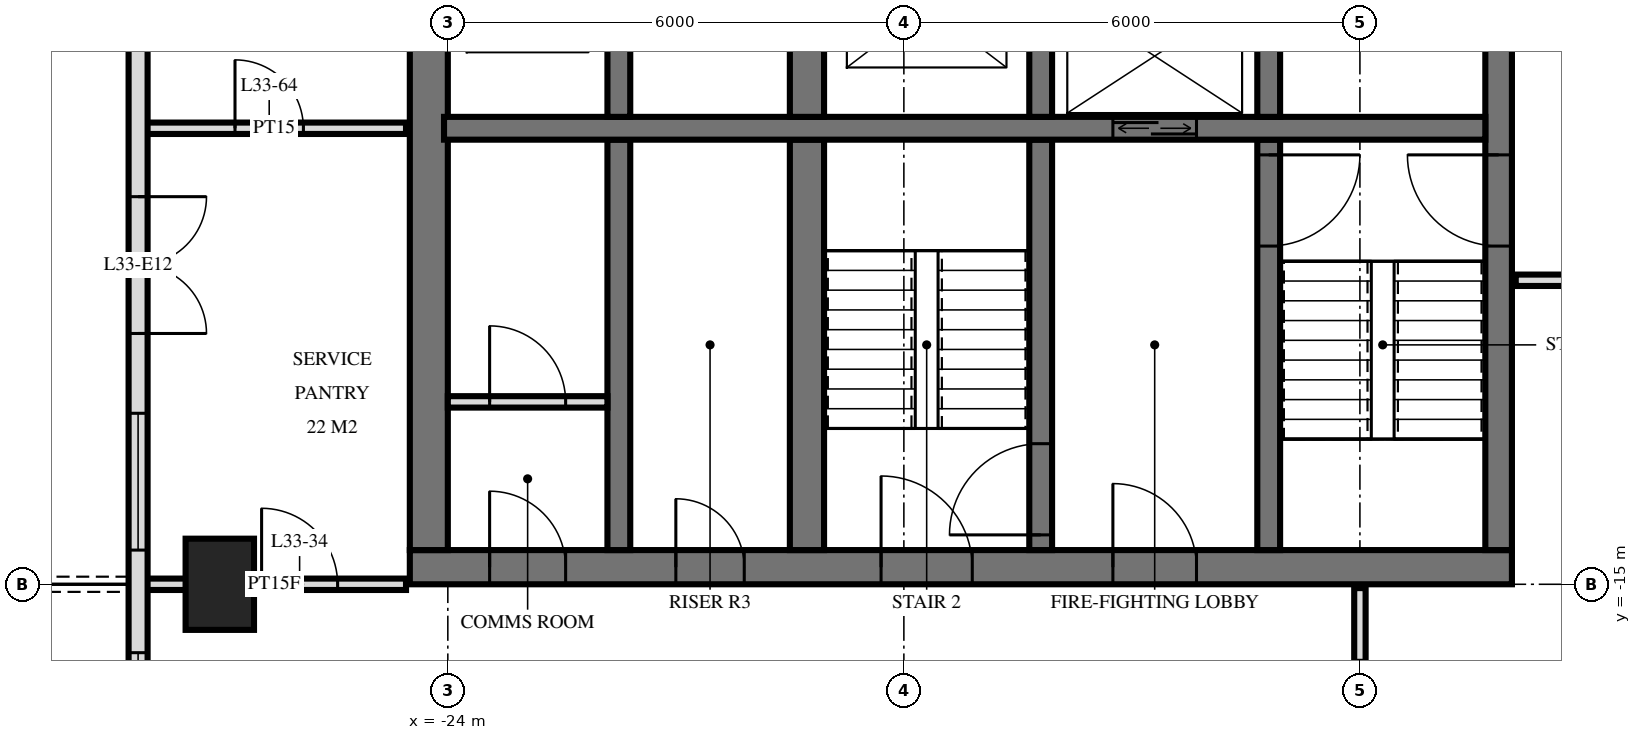
"""IFC4 building model, lengths in metres.
Left out: names, types, materials, properties, quantities, classifications, styles, units other than length and angle.
Written with IfcOpenShell. Run it as: python <this file> out.ifc"""

import sys

from ifc_helpers import new_model, si_unit, direction, frame, frame_2d, origin, origin_2d, place, context, subcontext, project, spatial, rectangle, extrude, element, fill, save


model = new_model("IFC4")
c1 = context("Model", 3, precision=1e-05, world=origin(), true_north=direction((0.0, 1.0)))
c2 = subcontext(c1, "Body", "Model", "MODEL_VIEW")
j1 = project(units=[si_unit("LENGTHUNIT", "METRE"), si_unit("PLANEANGLEUNIT", "RADIAN")], contexts=[c1])
p1 = place(None, origin())
s1 = spatial("IfcSite", under=j1, at=p1, CompositionType="ELEMENT")
p2 = place(p1, origin())
s2 = spatial("IfcBuilding", under=s1, at=p2, CompositionType="ELEMENT")
p3 = place(p2, frame((0.0, 0.0, 130.8)))
s3 = spatial("IfcBuildingStorey", under=s2, at=p3, CompositionType="ELEMENT", Elevation=130.8)
p4 = place(p3, frame((-27.0, -15.0, 0.0), z_axis=(0.0, 0.0, 1.0), x_axis=(0.0, 1.0, 0.0)))
e1 = element("IfcColumn", 1, at=p4, inside=s3, PredefinedType="COLUMN", context=c2, shape_type="SweptSolid", body=[
    extrude(rectangle(XDim=1.2, YDim=0.9, at=origin_2d()), origin(), (0.0, 0.0, 1.0), 3.6),
])
p5 = place(p3, frame((-24.5, -14.775, 0.0), z_axis=(0.0, 0.0, 1.0), x_axis=(1.0, 0.0, 0.0)))
e2 = element("IfcWall", 2, at=p5, inside=s3, PredefinedType="SHEAR", context=c2, shape_type="SweptSolid", body=[
    extrude(rectangle(XDim=14.5, YDim=0.45, at=frame_2d((7.25, 0.0))), origin(), (0.0, 0.0, 1.0), 3.6),
])
p6 = place(p5, frame((6.2, 0.0, 0.0)))
e3 = element("IfcOpeningElement", 3, at=p6, cuts=e2, PredefinedType="OPENING", context=c2, shape_type="SweptSolid", body=[
    extrude(rectangle(XDim=1.2, YDim=2.1, at=frame_2d((0.6, 1.05))), frame((0.0, 0.235, 0.0), z_axis=(0.0, -1.0, 0.0), x_axis=(1.0, 0.0, 0.0)), (0.0, 0.0, 1.0), 0.47),
])
p7 = place(p5, frame((9.25, 0.0, 0.0)))
e4 = element("IfcOpeningElement", 4, at=p7, cuts=e2, PredefinedType="OPENING", context=c2, shape_type="SweptSolid", body=[
    extrude(rectangle(XDim=1.1, YDim=2.1, at=frame_2d((0.55, 1.05))), frame((0.0, 0.235, 0.0), z_axis=(0.0, -1.0, 0.0), x_axis=(1.0, 0.0, 0.0)), (0.0, 0.0, 1.0), 0.47),
])
p8 = place(p5, frame((3.5, 0.0, 0.0)))
e5 = element("IfcOpeningElement", 5, at=p8, cuts=e2, PredefinedType="OPENING", context=c2, shape_type="SweptSolid", body=[
    extrude(rectangle(XDim=0.9, YDim=2.1, at=frame_2d((0.45, 1.05))), frame((0.0, 0.235, 0.0), z_axis=(0.0, -1.0, 0.0), x_axis=(1.0, 0.0, 0.0)), (0.0, 0.0, 1.0), 0.47),
])
p9 = place(p5, frame((1.05, 0.0, 0.0)))
e6 = element("IfcOpeningElement", 6, at=p9, cuts=e2, PredefinedType="OPENING", context=c2, shape_type="SweptSolid", body=[
    extrude(rectangle(XDim=1.0, YDim=2.1, at=frame_2d((0.5, 1.05))), frame((0.0, 0.235, 0.0), z_axis=(0.0, -1.0, 0.0), x_axis=(1.0, 0.0, 0.0)), (0.0, 0.0, 1.0), 0.47),
])
p10 = place(p3, frame((-10.175, -14.55, 0.0), z_axis=(0.0, 0.0, 1.0), x_axis=(0.0, 1.0, 0.0)))
e7 = element("IfcWall", 7, at=p10, inside=s3, PredefinedType="SHEAR", context=c2, shape_type="SweptSolid", body=[
    extrude(rectangle(XDim=14.1, YDim=0.35, at=frame_2d((7.05, 0.0))), origin(), (0.0, 0.0, 1.0), 3.6),
])
p11 = place(p10, frame((8.4, 0.0, 0.0)))
e8 = element("IfcOpeningElement", 8, at=p11, cuts=e7, PredefinedType="OPENING", context=c2, shape_type="SweptSolid", body=[
    extrude(rectangle(XDim=1.4, YDim=2.4, at=frame_2d((0.7, 1.2))), frame((0.0, 0.185, 0.0), z_axis=(0.0, -1.0, 0.0), x_axis=(1.0, 0.0, 0.0)), (0.0, 0.0, 1.0), 0.37),
])
p12 = place(p10, frame((10.0, 0.0, 0.0)))
e9 = element("IfcOpeningElement", 9, at=p12, cuts=e7, PredefinedType="OPENING", context=c2, shape_type="SweptSolid", body=[
    extrude(rectangle(XDim=1.4, YDim=2.4, at=frame_2d((0.7, 1.2))), frame((0.0, 0.185, 0.0), z_axis=(0.0, -1.0, 0.0), x_axis=(1.0, 0.0, 0.0)), (0.0, 0.0, 1.0), 0.37),
])
p13 = place(p10, frame((4.0, 0.0, 0.0)))
e10 = element("IfcOpeningElement", 10, at=p13, cuts=e7, PredefinedType="OPENING", context=c2, shape_type="SweptSolid", body=[
    extrude(rectangle(XDim=1.2, YDim=2.1, at=frame_2d((0.6, 1.05))), frame((0.0, 0.185, 0.0), z_axis=(0.0, -1.0, 0.0), x_axis=(1.0, 0.0, 0.0)), (0.0, 0.0, 1.0), 0.37),
])
p14 = place(p3, frame((-24.25, -14.55, 0.0), z_axis=(0.0, 0.0, 1.0), x_axis=(0.0, 1.0, 0.0)))
e11 = element("IfcWall", 11, at=p14, inside=s3, PredefinedType="SHEAR", context=c2, shape_type="SweptSolid", body=[
    extrude(rectangle(XDim=14.1, YDim=0.5, at=frame_2d((7.05, 0.0))), origin(), (0.0, 0.0, 1.0), 3.6),
])
p15 = place(p3, frame((-24.05, -9.0, 0.0), z_axis=(0.0, 0.0, 1.0), x_axis=(1.0, 0.0, 0.0)))
e12 = element("IfcWall", 12, at=p15, inside=s3, PredefinedType="SHEAR", context=c2, shape_type="SweptSolid", body=[
    extrude(rectangle(XDim=13.7, YDim=0.3, at=frame_2d((6.85, 0.0))), origin(), (0.0, 0.0, 1.0), 3.6),
])
p16 = place(p15, frame((8.8, 0.0, 0.0)))
e13 = element("IfcOpeningElement", 13, at=p16, cuts=e12, PredefinedType="OPENING", context=c2, shape_type="SweptSolid", body=[
    extrude(rectangle(XDim=1.1, YDim=2.1, at=frame_2d((0.55, 1.05))), frame((0.0, 0.16, 0.0), z_axis=(0.0, -1.0, 0.0), x_axis=(1.0, 0.0, 0.0)), (0.0, 0.0, 1.0), 0.32),
])
p17 = place(p3, frame((-13.2, -8.85, 0.0), z_axis=(0.0, 0.0, 1.0), x_axis=(0.0, 1.0, 0.0)))
e14 = element("IfcWall", 14, at=p17, inside=s3, PredefinedType="SHEAR", context=c2, shape_type="SweptSolid", body=[
    extrude(rectangle(XDim=2.3, YDim=0.3, at=frame_2d((1.15, 0.0))), origin(), (0.0, 0.0, 1.0), 3.6),
])
p18 = place(p3, frame((-13.2, -14.55, 0.0), z_axis=(0.0, 0.0, 1.0), x_axis=(0.0, 1.0, 0.0)))
e15 = element("IfcWall", 15, at=p18, inside=s3, PredefinedType="SHEAR", context=c2, shape_type="SweptSolid", body=[
    extrude(rectangle(XDim=5.4, YDim=0.3, at=frame_2d((2.7, 0.0))), origin(), (0.0, 0.0, 1.0), 3.6),
])
p19 = place(p18, frame((4.0, 0.0, 0.0)))
e16 = element("IfcOpeningElement", 16, at=p19, cuts=e15, PredefinedType="OPENING", context=c2, shape_type="SweptSolid", body=[
    extrude(rectangle(XDim=1.2, YDim=2.1, at=frame_2d((0.6, 1.05))), frame((0.0, 0.16, 0.0), z_axis=(0.0, -1.0, 0.0), x_axis=(1.0, 0.0, 0.0)), (0.0, 0.0, 1.0), 0.32),
])
p20 = place(p3, frame((-16.2, -8.85, 0.0), z_axis=(0.0, 0.0, 1.0), x_axis=(0.0, 1.0, 0.0)))
e17 = element("IfcWall", 17, at=p20, inside=s3, PredefinedType="SHEAR", context=c2, shape_type="SweptSolid", body=[
    extrude(rectangle(XDim=2.3, YDim=0.3, at=frame_2d((1.15, 0.0))), origin(), (0.0, 0.0, 1.0), 3.6),
])
p21 = place(p3, frame((-16.2, -14.55, 0.0), z_axis=(0.0, 0.0, 1.0), x_axis=(0.0, 1.0, 0.0)))
e18 = element("IfcWall", 18, at=p21, inside=s3, PredefinedType="SHEAR", context=c2, shape_type="SweptSolid", body=[
    extrude(rectangle(XDim=5.4, YDim=0.3, at=frame_2d((2.7, 0.0))), origin(), (0.0, 0.0, 1.0), 3.6),
])
p22 = place(p21, frame((0.2, 0.0, 0.0)))
e19 = element("IfcOpeningElement", 19, at=p22, cuts=e18, PredefinedType="OPENING", context=c2, shape_type="SweptSolid", body=[
    extrude(rectangle(XDim=1.2, YDim=2.1, at=frame_2d((0.6, 1.05))), frame((0.0, 0.16, 0.0), z_axis=(0.0, -1.0, 0.0), x_axis=(1.0, 0.0, 0.0)), (0.0, 0.0, 1.0), 0.32),
])
p23 = place(p3, frame((-19.275, -8.85, 0.0), z_axis=(0.0, 0.0, 1.0), x_axis=(0.0, 1.0, 0.0)))
e20 = element("IfcWall", 20, at=p23, inside=s3, PredefinedType="SHEAR", context=c2, shape_type="SweptSolid", body=[
    extrude(rectangle(XDim=2.3, YDim=0.45, at=frame_2d((1.15, 0.0))), origin(), (0.0, 0.0, 1.0), 3.6),
])
p24 = place(p3, frame((-19.275, -14.55, 0.0), z_axis=(0.0, 0.0, 1.0), x_axis=(0.0, 1.0, 0.0)))
e21 = element("IfcWall", 21, at=p24, inside=s3, PredefinedType="SHEAR", context=c2, shape_type="SweptSolid", body=[
    extrude(rectangle(XDim=5.4, YDim=0.45, at=frame_2d((2.7, 0.0))), origin(), (0.0, 0.0, 1.0), 3.6),
])
p25 = place(p3, frame((-21.75, -8.85, 0.0), z_axis=(0.0, 0.0, 1.0), x_axis=(0.0, 1.0, 0.0)))
e22 = element("IfcWall", 22, at=p25, inside=s3, PredefinedType="SHEAR", context=c2, shape_type="SweptSolid", body=[
    extrude(rectangle(XDim=2.3, YDim=0.3, at=frame_2d((1.15, 0.0))), origin(), (0.0, 0.0, 1.0), 3.6),
])
p26 = place(p3, frame((-21.75, -14.55, 0.0), z_axis=(0.0, 0.0, 1.0), x_axis=(0.0, 1.0, 0.0)))
e23 = element("IfcWall", 23, at=p26, inside=s3, PredefinedType="SHEAR", context=c2, shape_type="SweptSolid", body=[
    extrude(rectangle(XDim=5.4, YDim=0.3, at=frame_2d((2.7, 0.0))), origin(), (0.0, 0.0, 1.0), 3.6),
])
p27 = place(p3, frame((-28.075, -3.325, 0.0), z_axis=(0.0, 0.0, 1.0), x_axis=(0.0, -1.0, 0.0)))
e24 = element("IfcWall", 24, at=p27, inside=s3, PredefinedType="SOLIDWALL", context=c2, shape_type="SweptSolid", body=[
    extrude(rectangle(XDim=25.951, YDim=0.25, at=frame_2d((12.975, 0.0))), origin(), (0.0, 0.0, 1.0), 3.32),
])
p28 = place(p27, frame((6.575, 0.0, 0.0)))
e25 = element("IfcOpeningElement", 25, at=p28, cuts=e24, PredefinedType="OPENING", context=c2, shape_type="SweptSolid", body=[
    extrude(rectangle(XDim=1.8, YDim=2.4, at=frame_2d((0.9, 1.2))), frame((0.0, 0.135, 0.0), z_axis=(0.0, -1.0, 0.0), x_axis=(1.0, 0.0, 0.0)), (0.0, 0.0, 1.0), 0.27),
])
p29 = place(p27, frame((9.425, 0.0, 0.3)))
e26 = element("IfcOpeningElement", 26, at=p29, cuts=e24, PredefinedType="OPENING", context=c2, shape_type="SweptSolid", body=[
    extrude(rectangle(XDim=1.8, YDim=2.1, at=frame_2d((0.9, 1.05))), frame((0.0, 0.135, 0.0), z_axis=(0.0, -1.0, 0.0), x_axis=(1.0, 0.0, 0.0)), (0.0, 0.0, 1.0), 0.27),
])
p30 = place(p27, frame((12.575, 0.0, 0.3)))
e27 = element("IfcOpeningElement", 27, at=p30, cuts=e24, PredefinedType="OPENING", context=c2, shape_type="SweptSolid", body=[
    extrude(rectangle(XDim=1.2, YDim=2.1, at=frame_2d((0.6, 1.05))), frame((0.0, 0.135, 0.0), z_axis=(0.0, -1.0, 0.0), x_axis=(1.0, 0.0, 0.0)), (0.0, 0.0, 1.0), 0.27),
])
p31 = place(p27, frame((15.875, 0.0, 0.0)))
e28 = element("IfcOpeningElement", 28, at=p31, cuts=e24, PredefinedType="OPENING", context=c2, shape_type="SweptSolid", body=[
    extrude(rectangle(XDim=1.8, YDim=2.4, at=frame_2d((0.9, 1.2))), frame((0.0, 0.135, 0.0), z_axis=(0.0, -1.0, 0.0), x_axis=(1.0, 0.0, 0.0)), (0.0, 0.0, 1.0), 0.27),
])
p32 = place(p27, frame((21.075, 0.0, 0.0)))
e29 = element("IfcOpeningElement", 29, at=p32, cuts=e24, PredefinedType="OPENING", context=c2, shape_type="SweptSolid", body=[
    extrude(rectangle(XDim=1.8, YDim=2.4, at=frame_2d((0.9, 1.2))), frame((0.0, 0.135, 0.0), z_axis=(0.0, -1.0, 0.0), x_axis=(1.0, 0.0, 0.0)), (0.0, 0.0, 1.0), 0.27),
])
p33 = place(p27, frame((23.825, 0.0, 0.3)))
e30 = element("IfcOpeningElement", 30, at=p33, cuts=e24, PredefinedType="OPENING", context=c2, shape_type="SweptSolid", body=[
    extrude(rectangle(XDim=1.8, YDim=2.1, at=frame_2d((0.9, 1.05))), frame((0.0, 0.135, 0.0), z_axis=(0.0, -1.0, 0.0), x_axis=(1.0, 0.0, 0.0)), (0.0, 0.0, 1.0), 0.27),
])
p34 = place(p3, frame((-24.0, -12.6, 0.0), z_axis=(0.0, 0.0, 1.0), x_axis=(1.0, 0.0, 0.0)))
e31 = element("IfcWall", 31, at=p34, inside=s3, PredefinedType="PARTITIONING", context=c2, shape_type="SweptSolid", body=[
    extrude(rectangle(XDim=2.1, YDim=0.15, at=frame_2d((1.05, 0.0))), origin(), (0.0, 0.0, 1.0), 3.3),
])
p35 = place(p34, frame((0.55, 0.0, 0.0)))
e32 = element("IfcOpeningElement", 32, at=p35, cuts=e31, PredefinedType="OPENING", context=c2, shape_type="SweptSolid", body=[
    extrude(rectangle(XDim=1.0, YDim=2.1, at=frame_2d((0.5, 1.05))), frame((0.0, 0.085, 0.0), z_axis=(0.0, -1.0, 0.0), x_axis=(1.0, 0.0, 0.0)), (0.0, 0.0, 1.0), 0.17),
])
p36 = place(p3, frame((-12.0, -18.0, 0.0), z_axis=(0.0, 0.0, 1.0), x_axis=(0.0, 1.0, 0.0)))
e33 = element("IfcWall", 33, at=p36, inside=s3, PredefinedType="PARTITIONING", context=c2, shape_type="SweptSolid", body=[
    extrude(rectangle(XDim=2.95, YDim=0.15, at=frame_2d((1.475, 0.0))), origin(), (0.0, 0.0, 1.0), 3.32),
])
p37 = place(p36, frame((1.0, 0.0, 0.0)))
e34 = element("IfcOpeningElement", 34, at=p37, cuts=e33, PredefinedType="OPENING", context=c2, shape_type="SweptSolid", body=[
    extrude(rectangle(XDim=1.0, YDim=2.1, at=frame_2d((0.5, 1.05))), frame((0.0, 0.085, 0.0), z_axis=(0.0, -1.0, 0.0), x_axis=(1.0, 0.0, 0.0)), (0.0, 0.0, 1.0), 0.17),
])
p38 = place(p3, frame((-28.02, -15.0, 0.0), z_axis=(0.0, 0.0, 1.0), x_axis=(1.0, 0.0, 0.0)))
e35 = element("IfcWall", 35, at=p38, inside=s3, PredefinedType="PARTITIONING", context=c2, shape_type="SweptSolid", body=[
    extrude(rectangle(XDim=3.47, YDim=0.15, at=frame_2d((1.735, 0.0))), origin(), (0.0, 0.0, 1.0), 3.32),
])
p39 = place(p38, frame((1.57, 0.0, 0.0)))
e36 = element("IfcOpeningElement", 36, at=p39, cuts=e35, PredefinedType="OPENING", context=c2, shape_type="SweptSolid", body=[
    extrude(rectangle(XDim=1.0, YDim=2.1, at=frame_2d((0.5, 1.05))), frame((0.0, 0.085, 0.0), z_axis=(0.0, -1.0, 0.0), x_axis=(1.0, 0.0, 0.0)), (0.0, 0.0, 1.0), 0.17),
])
p40 = place(p3, frame((-9.95, -11.0, 0.0), z_axis=(0.0, 0.0, 1.0), x_axis=(1.0, 0.0, 0.0)))
e37 = element("IfcWall", 37, at=p40, inside=s3, PredefinedType="PARTITIONING", context=c2, shape_type="SweptSolid", body=[
    extrude(rectangle(XDim=19.9, YDim=0.15, at=frame_2d((9.95, 0.0))), origin(), (0.0, 0.0, 1.0), 3.32),
])
p41 = place(p40, frame((9.45, 0.0, 0.0)))
e38 = element("IfcOpeningElement", 38, at=p41, cuts=e37, PredefinedType="OPENING", context=c2, shape_type="SweptSolid", body=[
    extrude(rectangle(XDim=1.0, YDim=2.1, at=frame_2d((0.5, 1.05))), frame((0.0, 0.085, 0.0), z_axis=(0.0, -1.0, 0.0), x_axis=(1.0, 0.0, 0.0)), (0.0, 0.0, 1.0), 0.17),
])
p42 = place(p40, frame((3.45, 0.0, 0.0)))
e39 = element("IfcOpeningElement", 39, at=p42, cuts=e37, PredefinedType="OPENING", context=c2, shape_type="SweptSolid", body=[
    extrude(rectangle(XDim=1.0, YDim=2.1, at=frame_2d((0.5, 1.05))), frame((0.0, 0.085, 0.0), z_axis=(0.0, -1.0, 0.0), x_axis=(1.0, 0.0, 0.0)), (0.0, 0.0, 1.0), 0.17),
])
p43 = place(p3, frame((-28.02, -9.0, 0.0), z_axis=(0.0, 0.0, 1.0), x_axis=(1.0, 0.0, 0.0)))
e40 = element("IfcWall", 40, at=p43, inside=s3, PredefinedType="PARTITIONING", context=c2, shape_type="SweptSolid", body=[
    extrude(rectangle(XDim=3.47, YDim=0.15, at=frame_2d((1.735, 0.0))), origin(), (0.0, 0.0, 1.0), 3.32),
])
p44 = place(p43, frame((1.22, 0.0, 0.0)))
e41 = element("IfcOpeningElement", 41, at=p44, cuts=e40, PredefinedType="OPENING", context=c2, shape_type="SweptSolid", body=[
    extrude(rectangle(XDim=0.9, YDim=2.1, at=frame_2d((0.45, 1.05))), frame((0.0, 0.085, 0.0), z_axis=(0.0, -1.0, 0.0), x_axis=(1.0, 0.0, 0.0)), (0.0, 0.0, 1.0), 0.17),
])
p45 = place(p28, origin())
e42 = element("IfcDoor", 42, at=p45, inside=s3, OperationType="DOUBLE_DOOR_SINGLE_SWING", PredefinedType="DOOR", context=c2, shape_type="SweptSolid", body=[
    extrude(rectangle(XDim=1.8, YDim=2.4, at=frame_2d((0.9, 1.2))), frame((0.0, 0.025, 0.0), z_axis=(0.0, -1.0, 0.0), x_axis=(1.0, 0.0, 0.0)), (0.0, 0.0, 1.0), 0.05),
])
fill(e25, e42)
p46 = place(p29, origin())
e43 = element("IfcWindow", 43, at=p46, inside=s3, PartitioningType="SINGLE_PANEL", PredefinedType="WINDOW", context=c2, shape_type="SweptSolid", body=[
    extrude(rectangle(XDim=1.8, YDim=2.1, at=frame_2d((0.9, 1.05))), frame((0.0, 0.03, 0.0), z_axis=(0.0, -1.0, 0.0), x_axis=(1.0, 0.0, 0.0)), (0.0, 0.0, 1.0), 0.06),
])
fill(e26, e43)
p47 = place(p30, origin())
e44 = element("IfcWindow", 44, at=p47, inside=s3, PartitioningType="SINGLE_PANEL", PredefinedType="WINDOW", context=c2, shape_type="SweptSolid", body=[
    extrude(rectangle(XDim=1.2, YDim=2.1, at=frame_2d((0.6, 1.05))), frame((0.0, 0.03, 0.0), z_axis=(0.0, -1.0, 0.0), x_axis=(1.0, 0.0, 0.0)), (0.0, 0.0, 1.0), 0.06),
])
fill(e27, e44)
p48 = place(p16, origin())
e45 = element("IfcDoor", 45, at=p48, inside=s3, OperationType="DOUBLE_DOOR_SLIDING", PredefinedType="USERDEFINED", context=c2, shape_type="SweptSolid", body=[
    extrude(rectangle(XDim=1.1, YDim=2.1, at=frame_2d((0.55, 1.05))), frame((0.0, 0.025, 0.0), z_axis=(0.0, -1.0, 0.0), x_axis=(1.0, 0.0, 0.0)), (0.0, 0.0, 1.0), 0.05),
])
fill(e13, e45)
p49 = place(p13, origin())
e46 = element("IfcDoor", 46, at=p49, inside=s3, OperationType="SINGLE_SWING_LEFT", PredefinedType="DOOR", context=c2, shape_type="SweptSolid", body=[
    extrude(rectangle(XDim=1.2, YDim=2.1, at=frame_2d((0.6, 1.05))), frame((0.0, 0.025, 0.0), z_axis=(0.0, -1.0, 0.0), x_axis=(1.0, 0.0, 0.0)), (0.0, 0.0, 1.0), 0.05),
])
fill(e10, e46)
p50 = place(p6, origin())
e47 = element("IfcDoor", 47, at=p50, inside=s3, OperationType="SINGLE_SWING_RIGHT", PredefinedType="DOOR", context=c2, shape_type="SweptSolid", body=[
    extrude(rectangle(XDim=1.2, YDim=2.1, at=frame_2d((0.6, 1.05))), frame((0.0, 0.025, 0.0), z_axis=(0.0, -1.0, 0.0), x_axis=(1.0, 0.0, 0.0)), (0.0, 0.0, 1.0), 0.05),
])
fill(e3, e47)
p51 = place(p7, origin())
e48 = element("IfcDoor", 48, at=p51, inside=s3, OperationType="SINGLE_SWING_RIGHT", PredefinedType="DOOR", context=c2, shape_type="SweptSolid", body=[
    extrude(rectangle(XDim=1.1, YDim=2.1, at=frame_2d((0.55, 1.05))), frame((0.0, 0.025, 0.0), z_axis=(0.0, -1.0, 0.0), x_axis=(1.0, 0.0, 0.0)), (0.0, 0.0, 1.0), 0.05),
])
fill(e4, e48)
p52 = place(p8, origin())
e49 = element("IfcDoor", 49, at=p52, inside=s3, OperationType="SINGLE_SWING_RIGHT", PredefinedType="DOOR", context=c2, shape_type="SweptSolid", body=[
    extrude(rectangle(XDim=0.9, YDim=2.1, at=frame_2d((0.45, 1.05))), frame((0.0, 0.025, 0.0), z_axis=(0.0, -1.0, 0.0), x_axis=(1.0, 0.0, 0.0)), (0.0, 0.0, 1.0), 0.05),
])
fill(e5, e49)
p53 = place(p9, origin())
e50 = element("IfcDoor", 50, at=p53, inside=s3, OperationType="SINGLE_SWING_RIGHT", PredefinedType="DOOR", context=c2, shape_type="SweptSolid", body=[
    extrude(rectangle(XDim=1.0, YDim=2.1, at=frame_2d((0.5, 1.05))), frame((0.0, 0.025, 0.0), z_axis=(0.0, -1.0, 0.0), x_axis=(1.0, 0.0, 0.0)), (0.0, 0.0, 1.0), 0.05),
])
fill(e6, e50)
p54 = place(p19, frame((0.6, 0.0, 0.0), z_axis=(0.0, 0.0, 1.0), x_axis=(-1.0, 0.0, 0.0)))
e51 = element("IfcDoor", 51, at=p54, inside=s3, OperationType="SINGLE_SWING_RIGHT", PredefinedType="DOOR", context=c2, shape_type="SweptSolid", body=[
    extrude(rectangle(XDim=1.2, YDim=2.1, at=frame_2d((0.0, 1.05))), frame((0.0, -0.025, 0.0), z_axis=(0.0, 1.0, 0.0), x_axis=(-1.0, 0.0, 0.0)), (0.0, 0.0, 1.0), 0.05),
])
fill(e16, e51)
p55 = place(p22, origin())
e52 = element("IfcDoor", 52, at=p55, inside=s3, OperationType="SINGLE_SWING_RIGHT", PredefinedType="DOOR", context=c2, shape_type="SweptSolid", body=[
    extrude(rectangle(XDim=1.2, YDim=2.1, at=frame_2d((0.6, 1.05))), frame((0.0, 0.025, 0.0), z_axis=(0.0, -1.0, 0.0), x_axis=(1.0, 0.0, 0.0)), (0.0, 0.0, 1.0), 0.05),
])
fill(e19, e52)
p56 = place(p35, origin())
e53 = element("IfcDoor", 53, at=p56, inside=s3, OperationType="SINGLE_SWING_RIGHT", PredefinedType="DOOR", context=c2, shape_type="SweptSolid", body=[
    extrude(rectangle(XDim=1.0, YDim=2.1, at=frame_2d((0.5, 1.05))), frame((0.0, 0.025, 0.0), z_axis=(0.0, -1.0, 0.0), x_axis=(1.0, 0.0, 0.0)), (0.0, 0.0, 1.0), 0.05),
])
fill(e32, e53)
p57 = place(p39, origin())
e54 = element("IfcDoor", 54, at=p57, inside=s3, OperationType="SINGLE_SWING_RIGHT", PredefinedType="DOOR", context=c2, shape_type="SweptSolid", body=[
    extrude(rectangle(XDim=1.0, YDim=2.1, at=frame_2d((0.5, 1.05))), frame((0.0, 0.025, 0.0), z_axis=(0.0, -1.0, 0.0), x_axis=(1.0, 0.0, 0.0)), (0.0, 0.0, 1.0), 0.05),
])
fill(e36, e54)
p58 = place(p44, origin())
e55 = element("IfcDoor", 55, at=p58, inside=s3, OperationType="SINGLE_SWING_RIGHT", PredefinedType="DOOR", context=c2, shape_type="SweptSolid", body=[
    extrude(rectangle(XDim=0.9, YDim=2.1, at=frame_2d((0.45, 1.05))), frame((0.0, 0.025, 0.0), z_axis=(0.0, -1.0, 0.0), x_axis=(1.0, 0.0, 0.0)), (0.0, 0.0, 1.0), 0.05),
])
fill(e41, e55)
save(model, sys.argv[1])
